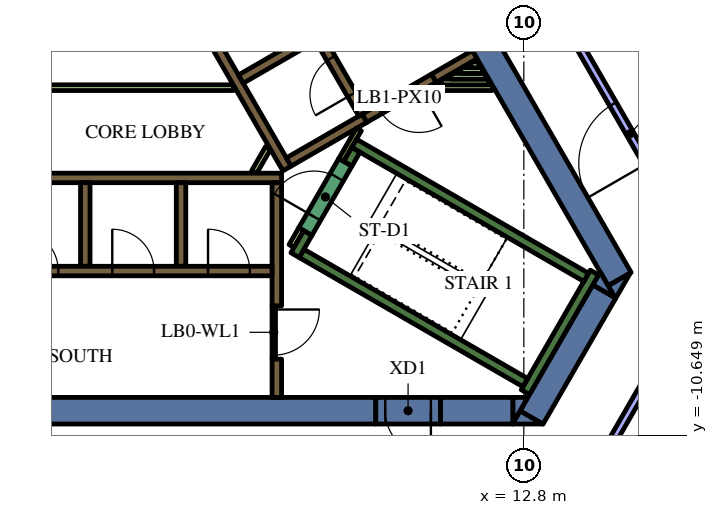
"""IFC4 building model, lengths in metres.
Left out: names, types, materials, properties, quantities, classifications, styles, units other than length and angle.
Written with IfcOpenShell. Run it as: python <this file> out.ifc"""

import sys

from ifc_helpers import new_model, si_unit, direction, frame, frame_2d, origin, place, context, subcontext, project, spatial, polyline, rectangle, outline, extrude, element, fill, save


model = new_model("IFC4")
c1 = context("Model", 3, precision=1e-05, world=origin(), true_north=direction((0.0, 1.0)))
c2 = subcontext(c1, "Body", "Model", "MODEL_VIEW")
j1 = project(units=[si_unit("LENGTHUNIT", "METRE"), si_unit("PLANEANGLEUNIT", "RADIAN")], contexts=[c1])
p1 = place(None, origin())
s1 = spatial("IfcSite", under=j1, at=p1, CompositionType="ELEMENT")
p2 = place(p1, origin())
s2 = spatial("IfcBuilding", under=s1, at=p2, CompositionType="ELEMENT")
p3 = place(p2, frame((0.0, 0.0, 252.0)))
s3 = spatial("IfcBuildingStorey", under=s2, at=p3, CompositionType="ELEMENT", Elevation=252.0)
p4 = place(p3, frame((9.085, 4.264, 0.0), z_axis=(0.0, 0.0, 1.0), x_axis=(0.499998082512, -0.866026510844, 0.0)))
e1 = element("IfcWall", 1, at=p4, inside=s3, PredefinedType="SOLIDWALL", context=c2, shape_type="SweptSolid", body=[
    extrude(rectangle(XDim=12.472, YDim=0.7, at=frame_2d((6.236, 0.0))), origin(), (0.0, 0.0, 1.0), 4.2),
])
p5 = place(p3, origin())
e2 = element("IfcWall", 2, at=p5, inside=s3, PredefinedType="SOLIDWALL", context=c2, shape_type="SweptSolid", body=[
    extrude(outline(polyline([(15.213, -7.05), (15.019, -6.714), (15.601, -6.378), (15.213, -7.05)])), origin(), (0.0, 0.0, 1.0), 4.2),
])
p6 = place(p3, frame((13.003, -10.179, 0.0), z_axis=(0.0, 0.0, 1.0), x_axis=(0.499972675833, 0.866041178825, 0.0)))
e3 = element("IfcWall", 3, at=p6, inside=s3, PredefinedType="SOLIDWALL", context=c2, shape_type="SweptSolid", body=[
    extrude(rectangle(XDim=3.829, YDim=0.7, at=frame_2d((1.915, 0.0))), origin(), (0.0, 0.0, 1.0), 4.2),
])
e4 = element("IfcWall", 4, at=p5, inside=s3, PredefinedType="SOLIDWALL", context=c2, shape_type="SweptSolid", body=[
    extrude(outline(polyline([(12.5, -10.35), (12.698, -10.005), (13.296, -10.35), (12.5, -10.35)])), origin(), (0.0, 0.0, 1.0), 4.2),
])
e5 = element("IfcWall", 5, at=p5, inside=s3, PredefinedType="SOLIDWALL", context=c2, shape_type="SweptSolid", body=[
    extrude(outline(polyline([(14.809, -6.35), (15.197, -7.022), (14.615, -6.686), (14.809, -6.35)])), origin(), (0.0, 0.0, 1.0), 4.2),
])
p7 = place(p3, frame((10.604, -10.0, 0.0), z_axis=(0.0, 0.0, 1.0), x_axis=(1.0, 0.0, 0.0)))
e6 = element("IfcWall", 6, at=p7, inside=s3, PredefinedType="SOLIDWALL", context=c2, shape_type="SweptSolid", body=[
    extrude(rectangle(XDim=1.909, YDim=0.7, at=frame_2d((0.955, 0.0))), origin(), (0.0, 0.0, 1.0), 4.2),
])
e7 = element("IfcWall", 7, at=p5, inside=s3, PredefinedType="SOLIDWALL", context=c2, shape_type="SweptSolid", body=[
    extrude(outline(polyline([(12.904, -9.65), (12.516, -10.322), (12.516, -9.65), (12.904, -9.65)])), origin(), (0.0, 0.0, 1.0), 4.2),
])
p8 = place(p3, frame((8.904, -10.0, 0.0), z_axis=(0.0, 0.0, 1.0), x_axis=(-1.0, 0.0, 0.0)))
e8 = element("IfcWall", 8, at=p8, inside=s3, PredefinedType="SOLIDWALL", context=c2, shape_type="SweptSolid", body=[
    extrude(rectangle(XDim=22.226, YDim=0.7, at=frame_2d((11.113, 0.0))), origin(), (0.0, 0.0, 1.0), 4.2),
])
p9 = place(p3, frame((12.84, -9.511, 0.0), z_axis=(0.0, 0.0, 1.0), x_axis=(0.500048121057, 0.865997619297, 0.0)))
e9 = element("IfcWall", 9, at=p9, inside=s3, PredefinedType="SOLIDWALL", context=c2, shape_type="SweptSolid", body=[
    extrude(rectangle(XDim=3.634, YDim=0.25, at=frame_2d((1.817, 0.0))), origin(), (0.0, 0.0, 1.0), 4.2),
])
p10 = place(p3, frame((12.84, -9.261, 0.0), z_axis=(0.0, 0.0, 1.0), x_axis=(-0.866013990052, 0.500019768644, 0.0)))
e10 = element("IfcWall", 10, at=p10, inside=s3, PredefinedType="SOLIDWALL", context=c2, shape_type="SweptSolid", body=[
    extrude(rectangle(XDim=6.8, YDim=0.25, at=frame_2d((3.4, 0.0))), origin(), (0.0, 0.0, 1.0), 4.2),
])
p11 = place(p3, frame((6.78, -5.906, 0.0), z_axis=(0.0, 0.0, 1.0), x_axis=(0.500223362819, 0.865896406789, 0.0)))
e11 = element("IfcWall", 11, at=p11, inside=s3, PredefinedType="SOLIDWALL", context=c2, shape_type="SweptSolid", body=[
    extrude(rectangle(XDim=0.675, YDim=0.25, at=frame_2d((0.337, 0.0))), origin(), (0.0, 0.0, 1.0), 4.2),
])
p12 = place(p3, frame((8.334, -2.964, 0.0), z_axis=(0.0, 0.0, 1.0), x_axis=(0.866016039709, -0.500016218704, 0.0)))
e12 = element("IfcWall", 12, at=p12, inside=s3, PredefinedType="SOLIDWALL", context=c2, shape_type="SweptSolid", body=[
    extrude(rectangle(XDim=7.05, YDim=0.25, at=frame_2d((3.525, 0.0))), origin(), (0.0, 0.0, 1.0), 4.2),
])
p13 = place(p3, frame((8.168, -3.503, 0.0), z_axis=(0.0, 0.0, 1.0), x_axis=(0.49972245349, 0.866185586049, 0.0)))
e13 = element("IfcWall", 13, at=p13, inside=s3, PredefinedType="SOLIDWALL", context=c2, shape_type="SweptSolid", body=[
    extrude(rectangle(XDim=0.425, YDim=0.25, at=frame_2d((0.212, 0.0))), origin(), (0.0, 0.0, 1.0), 4.2),
])
p14 = place(p3, frame((-5.545, -3.875, 0.0), z_axis=(0.0, 0.0, 1.0), x_axis=(1.0, 0.0, 0.0)))
e14 = element("IfcWall", 14, at=p14, inside=s3, PredefinedType="SOLIDWALL", context=c2, shape_type="SweptSolid", body=[
    extrude(rectangle(XDim=11.97, YDim=0.25, at=frame_2d((5.985, 0.0))), origin(), (0.0, 0.0, 1.0), 4.2),
])
p15 = place(p3, frame((6.3, -7.24, 0.0), z_axis=(0.0, 0.0, 1.0), x_axis=(0.0, 1.0, 0.0)))
e15 = element("IfcWall", 15, at=p15, inside=s3, PredefinedType="SOLIDWALL", context=c2, shape_type="SweptSolid", body=[
    extrude(rectangle(XDim=3.24, YDim=0.25, at=frame_2d((1.62, 0.0))), origin(), (0.0, 0.0, 1.0), 4.2),
])
p16 = place(p3, frame((6.3, -9.65, 0.0), z_axis=(0.0, 0.0, 1.0), x_axis=(0.0, 1.0, 0.0)))
e16 = element("IfcWall", 16, at=p16, inside=s3, PredefinedType="SOLIDWALL", context=c2, shape_type="SweptSolid", body=[
    extrude(rectangle(XDim=1.008, YDim=0.25, at=frame_2d((0.504, 0.0))), origin(), (0.0, 0.0, 1.0), 4.2),
])
for number, where, z_axis, x_axis in (
    (17, (3.78, -4.0, 0.0), (0.0, 0.0, 1.0), (0.0, -1.0, 0.0)),
    (18, (1.26, -4.0, 0.0), (0.0, 0.0, 1.0), (0.0, -1.0, 0.0)),
):
    element("IfcWall", number, at=place(p3, frame(where, z_axis=z_axis, x_axis=x_axis)), inside=s3, PredefinedType="SOLIDWALL", context=c2, shape_type="SweptSolid", body=[
        extrude(rectangle(XDim=2.2, YDim=0.25, at=frame_2d((1.1, 0.0))), origin(), (0.0, 0.0, 1.0), 4.2),
    ])
p17 = place(p3, frame((11.507, -0.631, 0.0), z_axis=(0.0, 0.0, 1.0), x_axis=(-0.866025525965, -0.499999788377, 0.0)))
e19 = element("IfcWall", 19, at=p17, inside=s3, PredefinedType="SOLIDWALL", context=c2, shape_type="SweptSolid", body=[
    extrude(rectangle(XDim=1.245, YDim=0.25, at=frame_2d((0.622, 0.0))), origin(), (0.0, 0.0, 1.0), 4.2),
])
p18 = place(p3, frame((6.568, -3.627, 0.0), z_axis=(0.0, 0.0, 1.0), x_axis=(-0.499999455981, 0.866025717874, 0.0)))
e20 = element("IfcWall", 20, at=p18, inside=s3, PredefinedType="SOLIDWALL", context=c2, shape_type="SweptSolid", body=[
    extrude(rectangle(XDim=11.978, YDim=0.25, at=frame_2d((5.989, 0.0))), origin(), (0.0, 0.0, 1.0), 4.2),
])
p19 = place(p3, frame((5.354, -1.274, 0.0), z_axis=(0.0, 0.0, 1.0), x_axis=(0.866008176907, 0.50002983664, 0.0)))
e21 = element("IfcWall", 21, at=p19, inside=s3, PredefinedType="SOLIDWALL", context=c2, shape_type="SweptSolid", body=[
    extrude(rectangle(XDim=2.2, YDim=0.25, at=frame_2d((1.1, 0.0))), origin(), (0.0, 0.0, 1.0), 4.2),
])
p20 = place(p3, frame((6.614, -3.456, 0.0), z_axis=(0.0, 0.0, 1.0), x_axis=(0.866025089694, 0.500000544019, 0.0)))
e22 = element("IfcWall", 22, at=p20, inside=s3, PredefinedType="SOLIDWALL", context=c2, shape_type="SweptSolid", body=[
    extrude(rectangle(XDim=2.305, YDim=0.25, at=frame_2d((1.153, 0.0))), origin(), (0.0, 0.0, 1.0), 4.2),
])
p21 = place(p3, frame((10.362, -1.5, 0.0), z_axis=(0.0, 0.0, 1.0), x_axis=(1.0, 0.0, 0.0)))
e23 = element("IfcWall", 23, at=p21, inside=s3, PredefinedType="PARTITIONING", context=c2, shape_type="SweptSolid", body=[
    extrude(rectangle(XDim=1.61, YDim=0.15, at=frame_2d((0.805, 0.0))), origin(), (0.0, 0.0, 1.0), 3.4),
])
p22 = place(p3, frame((10.622, -1.35, 0.0), z_axis=(0.0, 0.0, 1.0), x_axis=(1.0, 0.0, 0.0)))
e24 = element("IfcWall", 24, at=p22, inside=s3, PredefinedType="PARTITIONING", context=c2, shape_type="SweptSolid", body=[
    extrude(rectangle(XDim=1.263, YDim=0.15, at=frame_2d((0.632, 0.0))), origin(), (0.0, 0.0, 1.0), 3.4),
])
p23 = place(p3, frame((10.882, -1.2, 0.0), z_axis=(0.0, 0.0, 1.0), x_axis=(1.0, 0.0, 0.0)))
e25 = element("IfcWall", 25, at=p23, inside=s3, PredefinedType="PARTITIONING", context=c2, shape_type="SweptSolid", body=[
    extrude(rectangle(XDim=0.917, YDim=0.15, at=frame_2d((0.459, 0.0))), origin(), (0.0, 0.0, 1.0), 3.4),
])
p24 = place(p3, frame((11.712, -1.05, 0.0), z_axis=(0.0, 0.0, 1.0), x_axis=(-1.0, 0.0, 0.0)))
e26 = element("IfcWall", 26, at=p24, inside=s3, PredefinedType="PARTITIONING", context=c2, shape_type="SweptSolid", body=[
    extrude(rectangle(XDim=0.571, YDim=0.15, at=frame_2d((0.285, 0.0))), origin(), (0.0, 0.0, 1.0), 3.4),
])
p25 = place(p3, frame((11.401, -0.9, 0.0), z_axis=(0.0, 0.0, 1.0), x_axis=(1.0, 0.0, 0.0)))
e27 = element("IfcWall", 27, at=p25, inside=s3, PredefinedType="PARTITIONING", context=c2, shape_type="SweptSolid", body=[
    extrude(rectangle(XDim=0.224, YDim=0.15, at=frame_2d((0.112, 0.0))), origin(), (0.0, 0.0, 1.0), 3.4),
])
p26 = place(p3, frame((6.945, -5.222, 0.0), z_axis=(0.0, 0.0, 1.0), x_axis=(-0.499818422106, -0.866130212453, 0.0)))
e28 = element("IfcWall", 28, at=p26, inside=s3, PredefinedType="PARTITIONING", context=c2, shape_type="SweptSolid", body=[
    extrude(rectangle(XDim=0.514, YDim=0.15, at=frame_2d((0.257, 0.0))), origin(), (0.0, 0.0, 1.0), 3.4),
])
p27 = place(p3, frame((8.459, -2.599, 0.0), z_axis=(0.0, 0.0, 1.0), x_axis=(-0.500041054325, -0.866001699761, 0.0)))
e29 = element("IfcWall", 29, at=p27, inside=s3, PredefinedType="PARTITIONING", context=c2, shape_type="SweptSolid", body=[
    extrude(rectangle(XDim=0.929, YDim=0.15, at=frame_2d((0.464, 0.0))), origin(), (0.0, 0.0, 1.0), 4.2),
])
p28 = place(p3, frame((5.705, -3.718, 0.0), z_axis=(0.0, 0.0, 1.0), x_axis=(0.499962090823, 0.866047289552, 0.0)))
e30 = element("IfcWall", 30, at=p28, inside=s3, PredefinedType="PARTITIONING", context=c2, shape_type="SweptSolid", body=[
    extrude(rectangle(XDim=0.735, YDim=0.15, at=frame_2d((0.367, 0.0))), origin(), (0.0, 0.0, 1.0), 3.4),
])
p29 = place(p3, frame((-4.2, -1.5, 0.0), z_axis=(0.0, 0.0, 1.0), x_axis=(1.0, 0.0, 0.0)))
e31 = element("IfcWall", 31, at=p29, inside=s3, PredefinedType="PARTITIONING", context=c2, shape_type="SweptSolid", body=[
    extrude(rectangle(XDim=9.359, YDim=0.15, at=frame_2d((4.68, 0.0))), origin(), (0.0, 0.0, 1.0), 3.4),
])
p30 = place(p3, frame((-0.544, -1.393, 0.0), z_axis=(0.0, 0.0, 1.0), x_axis=(0.499928740635, 0.866066541489, 0.0)))
e32 = element("IfcWall", 32, at=p30, inside=s3, PredefinedType="PARTITIONING", context=c2, shape_type="SweptSolid", body=[
    extrude(rectangle(XDim=1.912, YDim=0.15, at=frame_2d((0.956, 0.0))), origin(), (0.0, 0.0, 1.0), 3.4),
])
p31 = place(p3, frame((-6.175, -6.325, 0.0), z_axis=(0.0, 0.0, 1.0), x_axis=(1.0, 0.0, 0.0)))
e33 = element("IfcWall", 33, at=p31, inside=s3, PredefinedType="SOLIDWALL", context=c2, shape_type="SweptSolid", body=[
    extrude(rectangle(XDim=12.35, YDim=0.25, at=frame_2d((6.175, 0.0))), origin(), (0.0, 0.0, 1.0), 4.2),
])
p32 = place(p31, frame((0.585, 0.0, 0.0)))
e34 = element("IfcOpeningElement", 34, at=p32, cuts=e33, PredefinedType="OPENING", context=c2, shape_type="SweptSolid", body=[
    extrude(rectangle(XDim=1.1, YDim=2.1, at=frame_2d((0.55, 1.05))), frame((0.0, 0.135, 0.0), z_axis=(0.0, -1.0, 0.0), x_axis=(1.0, 0.0, 0.0)), (0.0, 0.0, 1.0), 0.27),
])
p33 = place(p31, frame((3.105, 0.0, 0.0)))
e35 = element("IfcOpeningElement", 35, at=p33, cuts=e33, PredefinedType="OPENING", context=c2, shape_type="SweptSolid", body=[
    extrude(rectangle(XDim=1.1, YDim=2.1, at=frame_2d((0.55, 1.05))), frame((0.0, 0.135, 0.0), z_axis=(0.0, -1.0, 0.0), x_axis=(1.0, 0.0, 0.0)), (0.0, 0.0, 1.0), 0.27),
])
p34 = place(p31, frame((5.625, 0.0, 0.0)))
e36 = element("IfcOpeningElement", 36, at=p34, cuts=e33, PredefinedType="OPENING", context=c2, shape_type="SweptSolid", body=[
    extrude(rectangle(XDim=1.1, YDim=2.1, at=frame_2d((0.55, 1.05))), frame((0.0, 0.135, 0.0), z_axis=(0.0, -1.0, 0.0), x_axis=(1.0, 0.0, 0.0)), (0.0, 0.0, 1.0), 0.27),
])
p35 = place(p31, frame((8.145, 0.0, 0.0)))
e37 = element("IfcOpeningElement", 37, at=p35, cuts=e33, PredefinedType="OPENING", context=c2, shape_type="SweptSolid", body=[
    extrude(rectangle(XDim=1.1, YDim=2.1, at=frame_2d((0.55, 1.05))), frame((0.0, 0.135, 0.0), z_axis=(0.0, -1.0, 0.0), x_axis=(1.0, 0.0, 0.0)), (0.0, 0.0, 1.0), 0.27),
])
p36 = place(p31, frame((10.665, 0.0, 0.0)))
e38 = element("IfcOpeningElement", 38, at=p36, cuts=e33, PredefinedType="OPENING", context=c2, shape_type="SweptSolid", body=[
    extrude(rectangle(XDim=1.1, YDim=2.1, at=frame_2d((0.55, 1.05))), frame((0.0, 0.135, 0.0), z_axis=(0.0, -1.0, 0.0), x_axis=(1.0, 0.0, 0.0)), (0.0, 0.0, 1.0), 0.27),
])
p37 = place(p3, frame((8.565, -2.185, 0.0), z_axis=(0.0, 0.0, 1.0), x_axis=(-0.499997954832, 0.866026584559, 0.0)))
e39 = element("IfcWall", 39, at=p37, inside=s3, PredefinedType="SOLIDWALL", context=c2, shape_type="SweptSolid", body=[
    extrude(rectangle(XDim=12.35, YDim=0.25, at=frame_2d((6.175, 0.0))), origin(), (0.0, 0.0, 1.0), 4.2),
])
p38 = place(p37, frame((0.585, 0.0, 0.0)))
e40 = element("IfcOpeningElement", 40, at=p38, cuts=e39, PredefinedType="OPENING", context=c2, shape_type="SweptSolid", body=[
    extrude(rectangle(XDim=1.1, YDim=2.1, at=frame_2d((0.55, 1.05))), frame((0.0, 0.135, 0.0), z_axis=(0.0, -1.0, 0.0), x_axis=(1.0, 0.0, 0.0)), (0.0, 0.0, 1.0), 0.27),
])
p39 = place(p3, frame((7.053, -5.284, 0.0), z_axis=(0.0, 0.0, 1.0), x_axis=(0.500078061341, 0.865980330357, 0.0)))
e41 = element("IfcWall", 41, at=p39, inside=s3, PredefinedType="SOLIDWALL", context=c2, shape_type="SweptSolid", body=[
    extrude(rectangle(XDim=2.1, YDim=0.4, at=frame_2d((1.05, 0.0))), origin(), (0.0, 0.0, 1.0), 4.2),
])
p40 = place(p39, frame((0.45, 0.0, 0.0)))
e42 = element("IfcOpeningElement", 42, at=p40, cuts=e41, PredefinedType="OPENING", context=c2, shape_type="SweptSolid", body=[
    extrude(rectangle(XDim=1.2, YDim=2.1, at=frame_2d((0.6, 1.05))), frame((0.0, 0.21, 0.0), z_axis=(0.0, -1.0, 0.0), x_axis=(1.0, 0.0, 0.0)), (0.0, 0.0, 1.0), 0.42),
])
p41 = place(p3, frame((6.22, -7.237, 0.0), z_axis=(0.0, 0.0, 1.0), x_axis=(0.0, -1.0, 0.0)))
e43 = element("IfcWall", 43, at=p41, inside=s3, PredefinedType="PARTITIONING", context=c2, shape_type="SweptSolid", body=[
    extrude(rectangle(XDim=1.4, YDim=0.09, at=frame_2d((0.7, 0.0))), origin(), (0.0, 0.0, 1.0), 3.4),
])
p42 = place(p41, frame((0.1, 0.0, 0.0)))
e44 = element("IfcOpeningElement", 44, at=p42, cuts=e43, PredefinedType="OPENING", context=c2, shape_type="SweptSolid", body=[
    extrude(rectangle(XDim=1.2, YDim=2.1, at=frame_2d((0.6, 1.05))), frame((0.0, 0.055, 0.0), z_axis=(0.0, -1.0, 0.0), x_axis=(1.0, 0.0, 0.0)), (0.0, 0.0, 1.0), 0.11),
])
p43 = place(p3, frame((10.429, -1.253, 0.0), z_axis=(0.0, 0.0, 1.0), x_axis=(-0.866009402589, -0.500027713859, 0.0)))
e45 = element("IfcWall", 45, at=p43, inside=s3, PredefinedType="SOLIDWALL", context=c2, shape_type="SweptSolid", body=[
    extrude(rectangle(XDim=2.1, YDim=0.25, at=frame_2d((1.05, 0.0))), origin(), (0.0, 0.0, 1.0), 4.2),
])
p44 = place(p43, frame((0.45, 0.0, 0.0)))
e46 = element("IfcOpeningElement", 46, at=p44, cuts=e45, PredefinedType="OPENING", context=c2, shape_type="SweptSolid", body=[
    extrude(rectangle(XDim=1.2, YDim=2.1, at=frame_2d((0.6, 1.05))), frame((0.0, 0.135, 0.0), z_axis=(0.0, -1.0, 0.0), x_axis=(1.0, 0.0, 0.0)), (0.0, 0.0, 1.0), 0.27),
])
p45 = place(p3, frame((10.604, -10.0, 0.0), z_axis=(0.0, 0.0, 1.0), x_axis=(-1.0, 0.0, 0.0)))
e47 = element("IfcWall", 47, at=p45, inside=s3, PredefinedType="SOLIDWALL", context=c2, shape_type="SweptSolid", body=[
    extrude(rectangle(XDim=1.7, YDim=0.7, at=frame_2d((0.85, 0.0))), origin(), (0.0, 0.0, 1.0), 4.2),
])
p46 = place(p45, frame((0.25, 0.0, 0.0)))
e48 = element("IfcOpeningElement", 48, at=p46, cuts=e47, PredefinedType="OPENING", context=c2, shape_type="SweptSolid", body=[
    extrude(rectangle(XDim=1.2, YDim=2.1, at=frame_2d((0.6, 1.05))), frame((0.0, 0.36, 0.0), z_axis=(0.0, -1.0, 0.0), x_axis=(1.0, 0.0, 0.0)), (0.0, 0.0, 1.0), 0.72),
])
p47 = place(p3, frame((14.362, -12.124, 0.0), z_axis=(0.0, 0.0, 1.0), x_axis=(0.500017005442, 0.866015585465, 0.0)))
e49 = element("IfcWall", 49, at=p47, inside=s3, PredefinedType="PARTITIONING", context=c2, shape_type="SweptSolid", body=[
    extrude(rectangle(XDim=6.338, YDim=0.2, at=frame_2d((3.169, 0.0))), origin(), (0.0, 0.0, 1.0), 3.4),
])
p48 = place(p3, frame((17.696, -6.35, 0.0), z_axis=(0.0, 0.0, 1.0), x_axis=(-0.500009576767, 0.866019874565, 0.0)))
e50 = element("IfcWall", 50, at=p48, inside=s3, PredefinedType="PARTITIONING", context=c2, shape_type="SweptSolid", body=[
    extrude(rectangle(XDim=8.317, YDim=0.2, at=frame_2d((4.159, 0.0))), origin(), (0.0, 0.0, 1.0), 3.4),
])
p49 = place(p48, frame((3.3, 0.0, 0.0)))
e51 = element("IfcOpeningElement", 51, at=p49, cuts=e50, PredefinedType="OPENING", context=c2, shape_type="SweptSolid", body=[
    extrude(rectangle(XDim=1.8, YDim=2.1, at=frame_2d((0.9, 1.05))), frame((0.0, 0.11, 0.0), z_axis=(0.0, -1.0, 0.0), x_axis=(1.0, 0.0, 0.0)), (0.0, 0.0, 1.0), 0.22),
])
p50 = place(p34, origin())
e52 = element("IfcDoor", 52, at=p50, inside=s3, OperationType="DOUBLE_DOOR_SLIDING", PredefinedType="DOOR", context=c2, shape_type="SweptSolid", body=[
    extrude(rectangle(XDim=1.1, YDim=2.1, at=frame_2d((0.55, 1.05))), frame((0.0, 0.025, 0.0), z_axis=(0.0, -1.0, 0.0), x_axis=(1.0, 0.0, 0.0)), (0.0, 0.0, 1.0), 0.05),
])
fill(e36, e52)
p51 = place(p35, origin())
e53 = element("IfcDoor", 53, at=p51, inside=s3, OperationType="DOUBLE_DOOR_SLIDING", PredefinedType="DOOR", context=c2, shape_type="SweptSolid", body=[
    extrude(rectangle(XDim=1.1, YDim=2.1, at=frame_2d((0.55, 1.05))), frame((0.0, 0.025, 0.0), z_axis=(0.0, -1.0, 0.0), x_axis=(1.0, 0.0, 0.0)), (0.0, 0.0, 1.0), 0.05),
])
fill(e37, e53)
p52 = place(p36, origin())
e54 = element("IfcDoor", 54, at=p52, inside=s3, OperationType="DOUBLE_DOOR_SLIDING", PredefinedType="DOOR", context=c2, shape_type="SweptSolid", body=[
    extrude(rectangle(XDim=1.1, YDim=2.1, at=frame_2d((0.55, 1.05))), frame((0.0, 0.025, 0.0), z_axis=(0.0, -1.0, 0.0), x_axis=(1.0, 0.0, 0.0)), (0.0, 0.0, 1.0), 0.05),
])
fill(e38, e54)
p53 = place(p38, origin())
e55 = element("IfcDoor", 55, at=p53, inside=s3, OperationType="DOUBLE_DOOR_SLIDING", PredefinedType="DOOR", context=c2, shape_type="SweptSolid", body=[
    extrude(rectangle(XDim=1.1, YDim=2.1, at=frame_2d((0.55, 1.05))), frame((0.0, 0.025, 0.0), z_axis=(0.0, -1.0, 0.0), x_axis=(1.0, 0.0, 0.0)), (0.0, 0.0, 1.0), 0.05),
])
fill(e40, e55)
p54 = place(p40, origin())
e56 = element("IfcDoor", 56, at=p54, inside=s3, OperationType="SINGLE_SWING_LEFT", PredefinedType="DOOR", context=c2, shape_type="SweptSolid", body=[
    extrude(rectangle(XDim=1.2, YDim=2.1, at=frame_2d((0.6, 1.05))), frame((0.0, 0.025, 0.0), z_axis=(0.0, -1.0, 0.0), x_axis=(1.0, 0.0, 0.0)), (0.0, 0.0, 1.0), 0.05),
])
fill(e42, e56)
p55 = place(p42, origin())
e57 = element("IfcDoor", 57, at=p55, inside=s3, OperationType="SINGLE_SWING_LEFT", PredefinedType="DOOR", context=c2, shape_type="SweptSolid", body=[
    extrude(rectangle(XDim=1.2, YDim=2.1, at=frame_2d((0.6, 1.05))), frame((0.0, 0.025, 0.0), z_axis=(0.0, -1.0, 0.0), x_axis=(1.0, 0.0, 0.0)), (0.0, 0.0, 1.0), 0.05),
])
fill(e44, e57)
p56 = place(p44, origin())
e58 = element("IfcDoor", 58, at=p56, inside=s3, OperationType="SINGLE_SWING_LEFT", PredefinedType="DOOR", context=c2, shape_type="SweptSolid", body=[
    extrude(rectangle(XDim=1.2, YDim=2.1, at=frame_2d((0.6, 1.05))), frame((0.0, 0.025, 0.0), z_axis=(0.0, -1.0, 0.0), x_axis=(1.0, 0.0, 0.0)), (0.0, 0.0, 1.0), 0.05),
])
fill(e46, e58)
p57 = place(p46, origin())
e59 = element("IfcDoor", 59, at=p57, inside=s3, OperationType="SINGLE_SWING_LEFT", PredefinedType="DOOR", context=c2, shape_type="SweptSolid", body=[
    extrude(rectangle(XDim=1.2, YDim=2.1, at=frame_2d((0.6, 1.05))), frame((0.0, 0.025, 0.0), z_axis=(0.0, -1.0, 0.0), x_axis=(1.0, 0.0, 0.0)), (0.0, 0.0, 1.0), 0.05),
])
fill(e48, e59)
p58 = place(p49, origin())
e60 = element("IfcDoor", 60, at=p58, inside=s3, OperationType="DOUBLE_DOOR_SINGLE_SWING", PredefinedType="DOOR", context=c2, shape_type="SweptSolid", body=[
    extrude(rectangle(XDim=1.8, YDim=2.1, at=frame_2d((0.9, 1.05))), frame((0.0, 0.025, 0.0), z_axis=(0.0, -1.0, 0.0), x_axis=(1.0, 0.0, 0.0)), (0.0, 0.0, 1.0), 0.05),
])
fill(e51, e60)
save(model, sys.argv[1])
